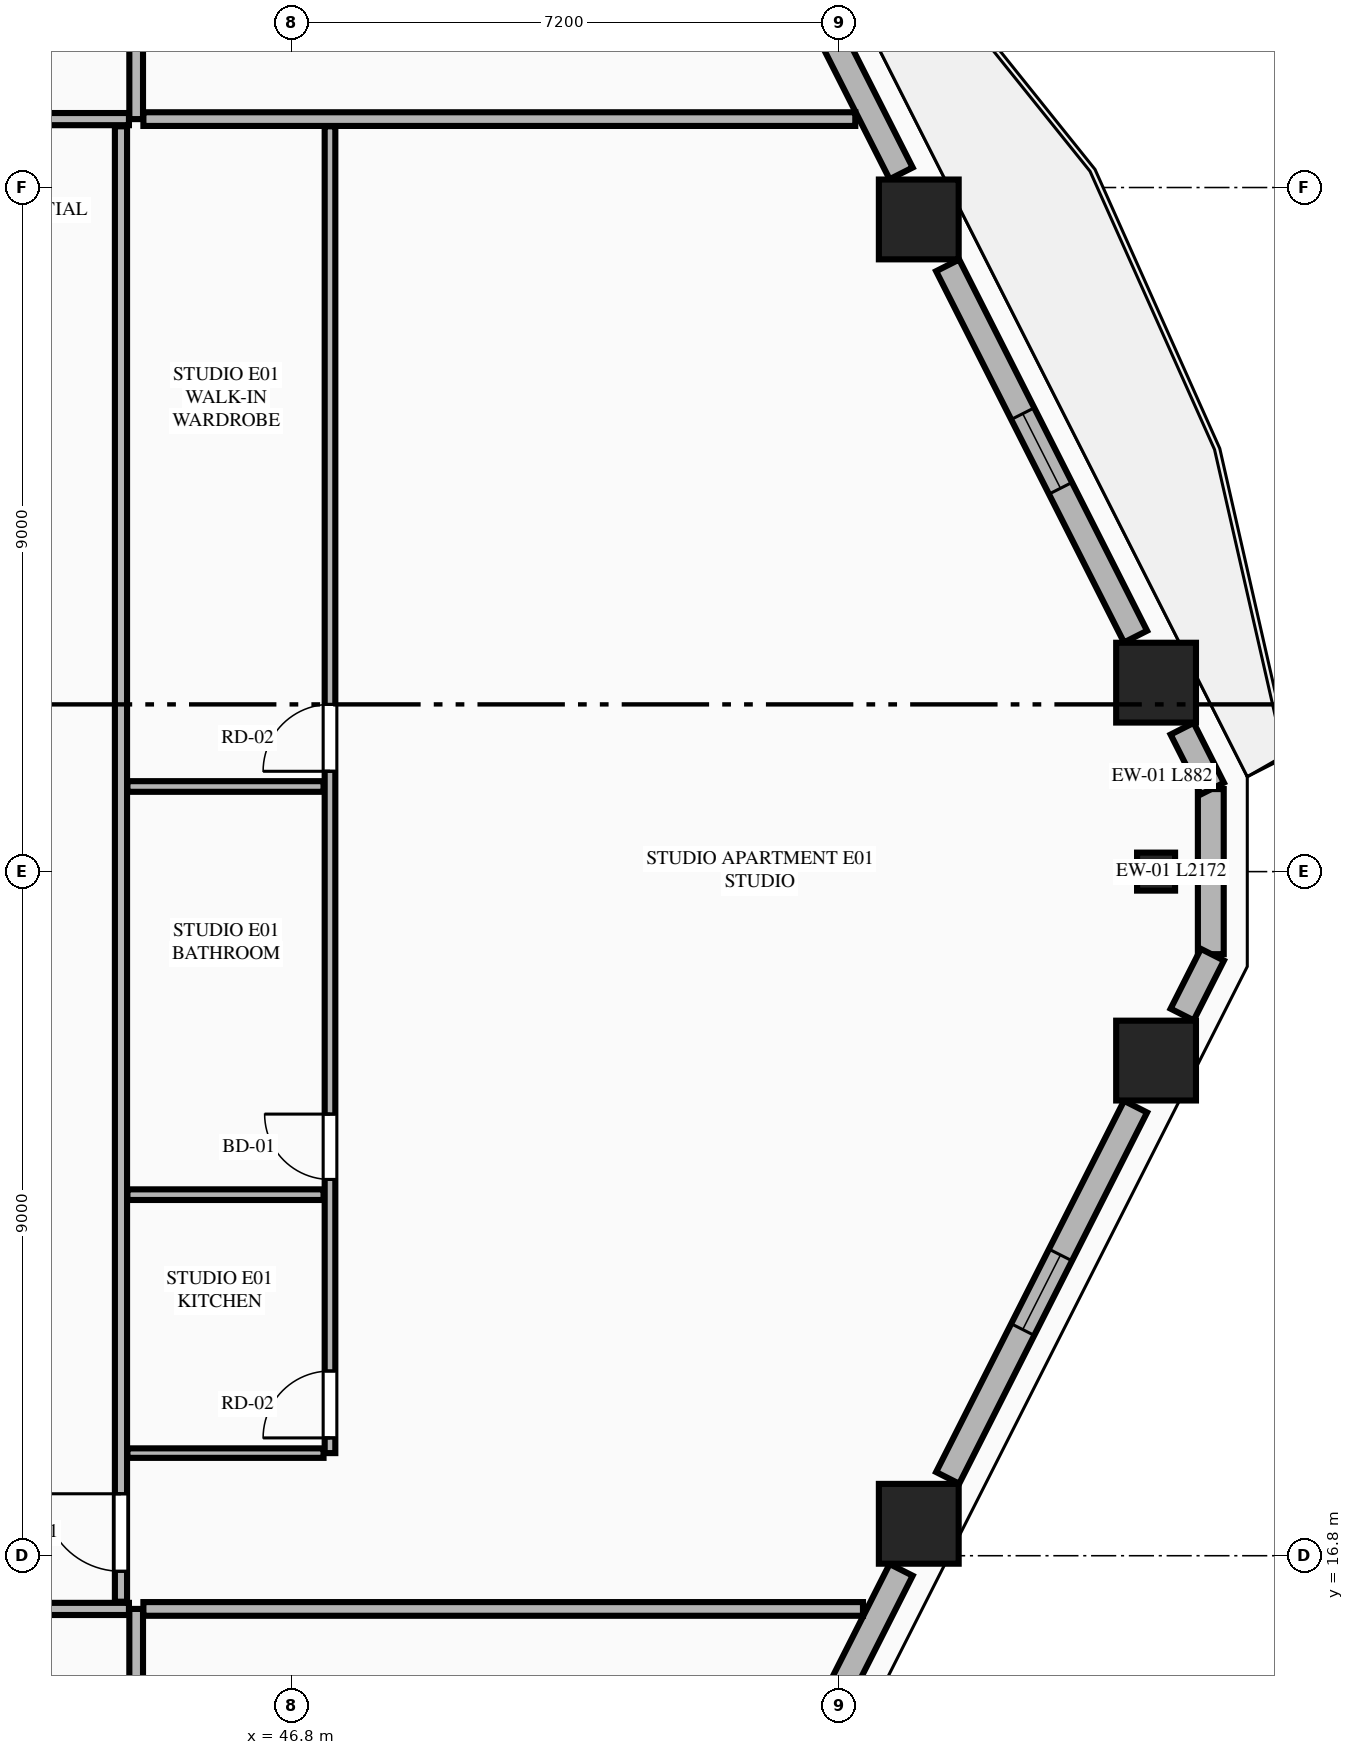
"""IFC4 building model, lengths in metres.
Left out: names, types, materials, properties, quantities, classifications, styles, units other than length and angle.
Written with IfcOpenShell. Run it as: python <this file> out.ifc"""

import sys

from ifc_helpers import new_model, si_unit, direction, frame, frame_2d, origin, origin_2d, place, context, subcontext, project, spatial, rectangle, extrude, element, fill, save


model = new_model("IFC4")
c1 = context("Model", 3, precision=1e-05, world=origin(), true_north=direction((0.0, 1.0)))
c2 = subcontext(c1, "Body", "Model", "MODEL_VIEW")
j1 = project(units=[si_unit("LENGTHUNIT", "METRE"), si_unit("PLANEANGLEUNIT", "RADIAN")], contexts=[c1])
p1 = place(None, origin())
s1 = spatial("IfcSite", under=j1, at=p1, CompositionType="ELEMENT")
p2 = place(p1, origin())
s2 = spatial("IfcBuilding", under=s1, at=p2, CompositionType="ELEMENT")
p3 = place(p2, frame((0.0, 0.0, 87.1)))
s3 = spatial("IfcBuildingStorey", under=s2, at=p3, CompositionType="ELEMENT", Elevation=87.1)
for number, where, z_axis, x_axis in (
    (1, (55.046, 17.22, 0.0), (0.0, 0.0, 1.0), (1.0, 0.0, 0.0)),
    (2, (58.168, 23.314, 0.0), (0.0, 0.0, 1.0), (1.0, 0.0, 0.0)),
    (3, (58.168, 28.286, 0.0), (0.0, 0.0, 1.0), (1.0, 0.0, 0.0)),
    (4, (55.046, 34.38, 0.0), (0.0, 0.0, 1.0), (1.0, 0.0, 0.0)),
):
    element("IfcColumn", number, at=place(p3, frame(where, z_axis=z_axis, x_axis=x_axis)), inside=s3, PredefinedType="COLUMN", context=c2, shape_type="SweptSolid", body=[
        extrude(rectangle(XDim=1.05, YDim=1.05, at=origin_2d()), origin(), (0.0, 0.0, 1.0), 3.55),
    ])
p4 = place(p3, frame((58.168, 25.8, 0.0), z_axis=(0.0, 0.0, 1.0), x_axis=(0.0, 1.0, 0.0)))
e5 = element("IfcColumn", 5, at=p4, inside=s3, PredefinedType="PILASTER", context=c2, shape_type="SweptSolid", body=[
    extrude(rectangle(XDim=0.5, YDim=0.35, at=origin_2d()), origin(), (0.0, 0.0, 1.0), 3.55),
])
p5 = place(p3, frame((58.888, 24.714, 0.0), z_axis=(0.0, 0.0, 1.0), x_axis=(0.0, 1.0, 0.0)))
e6 = element("IfcWall", 6, at=p5, inside=s3, PredefinedType="STANDARD", context=c2, shape_type="SweptSolid", body=[
    extrude(rectangle(XDim=2.172, YDim=0.34, at=frame_2d((1.086, 0.0))), origin(), (0.0, 0.0, 1.0), 3.33),
])
p6 = place(p3, frame((52.233, 11.515, 0.0), z_axis=(0.0, 0.0, 1.0), x_axis=(0.451616680182, 0.892212067942, 0.0)))
e7 = element("IfcWall", 7, at=p6, inside=s3, PredefinedType="STANDARD", context=c2, shape_type="SweptSolid", body=[
    extrude(rectangle(XDim=5.715, YDim=0.34, at=frame_2d((2.857, 0.0))), origin(), (0.0, 0.0, 1.0), 2.787),
])
p7 = place(p6, frame((2.308, 0.0, 0.75)))
e8 = element("IfcOpeningElement", 8, at=p7, cuts=e7, PredefinedType="OPENING", context=c2, shape_type="SweptSolid", body=[
    extrude(rectangle(XDim=1.1, YDim=1.887, at=frame_2d((0.55, 0.943))), frame((0.0, 0.18, 0.0), z_axis=(0.0, -1.0, 0.0), x_axis=(1.0, 0.0, 0.0)), (0.0, 0.0, 1.0), 0.36),
])
p8 = place(p3, frame((55.426, 17.824, 0.0), z_axis=(0.0, 0.0, 1.0), x_axis=(0.451579095309, 0.892231091523, 0.0)))
e9 = element("IfcWall", 9, at=p8, inside=s3, PredefinedType="STANDARD", context=c2, shape_type="SweptSolid", body=[
    extrude(rectangle(XDim=5.474, YDim=0.34, at=frame_2d((2.737, 0.0))), origin(), (0.0, 0.0, 1.0), 2.787),
])
p9 = place(p8, frame((2.187, 0.0, 0.75)))
e10 = element("IfcOpeningElement", 10, at=p9, cuts=e9, PredefinedType="OPENING", context=c2, shape_type="SweptSolid", body=[
    extrude(rectangle(XDim=1.1, YDim=1.887, at=frame_2d((0.55, 0.943))), frame((0.0, 0.18, 0.0), z_axis=(0.0, -1.0, 0.0), x_axis=(1.0, 0.0, 0.0)), (0.0, 0.0, 1.0), 0.36),
])
p10 = place(p3, frame((58.511, 23.92, 0.0), z_axis=(0.0, 0.0, 1.0), x_axis=(0.451195173259, 0.892425299747, 0.0)))
e11 = element("IfcWall", 11, at=p10, inside=s3, PredefinedType="STANDARD", context=c2, shape_type="SweptSolid", body=[
    extrude(rectangle(XDim=0.882, YDim=0.34, at=frame_2d((0.441, 0.0))), origin(), (0.0, 0.0, 1.0), 3.33),
])
p11 = place(p3, frame((58.909, 26.893, 0.0), z_axis=(0.0, 0.0, 1.0), x_axis=(-0.451306655769, 0.892368927327, 0.0)))
e12 = element("IfcWall", 12, at=p11, inside=s3, PredefinedType="STANDARD", context=c2, shape_type="SweptSolid", body=[
    extrude(rectangle(XDim=0.882, YDim=0.34, at=frame_2d((0.441, 0.0))), origin(), (0.0, 0.0, 1.0), 3.33),
])
p12 = place(p3, frame((57.898, 28.892, 0.0), z_axis=(0.0, 0.0, 1.0), x_axis=(-0.451597066012, 0.892221995901, 0.0)))
e13 = element("IfcWall", 13, at=p12, inside=s3, PredefinedType="STANDARD", context=c2, shape_type="SweptSolid", body=[
    extrude(rectangle(XDim=5.474, YDim=0.34, at=frame_2d((2.737, 0.0))), origin(), (0.0, 0.0, 1.0), 2.787),
])
p13 = place(p12, frame((2.187, 0.0, 0.75)))
e14 = element("IfcOpeningElement", 14, at=p13, cuts=e13, PredefinedType="OPENING", context=c2, shape_type="SweptSolid", body=[
    extrude(rectangle(XDim=1.1, YDim=1.887, at=frame_2d((0.55, 0.943))), frame((0.0, 0.18, 0.0), z_axis=(0.0, -1.0, 0.0), x_axis=(1.0, 0.0, 0.0)), (0.0, 0.0, 1.0), 0.36),
])
p14 = place(p3, frame((54.814, 34.986, 0.0), z_axis=(0.0, 0.0, 1.0), x_axis=(-0.451633893529, 0.892203354744, 0.0)))
e15 = element("IfcWall", 15, at=p14, inside=s3, PredefinedType="STANDARD", context=c2, shape_type="SweptSolid", body=[
    extrude(rectangle(XDim=5.715, YDim=0.34, at=frame_2d((2.857, 0.0))), origin(), (0.0, 0.0, 1.0), 2.787),
])
p15 = place(p14, frame((2.833, 0.0, 0.0)))
e16 = element("IfcOpeningElement", 16, at=p15, cuts=e15, PredefinedType="OPENING", context=c2, shape_type="SweptSolid", body=[
    extrude(rectangle(XDim=1.1, YDim=2.25, at=frame_2d((0.55, 1.125))), frame((0.0, 0.18, 0.0), z_axis=(0.0, -1.0, 0.0), x_axis=(1.0, 0.0, 0.0)), (0.0, 0.0, 1.0), 0.36),
])
p16 = place(p3, frame((44.75, 2.455, 0.0), z_axis=(0.0, 0.0, 1.0), x_axis=(0.0, 1.0, 0.0)))
e17 = element("IfcWall", 17, at=p16, inside=s3, PredefinedType="PARTITIONING", context=c2, shape_type="SweptSolid", body=[
    extrude(rectangle(XDim=13.645, YDim=0.18, at=frame_2d((6.823, 0.0))), origin(), (0.0, 0.0, 1.0), 3.33),
])
p17 = place(p3, frame((36.617, 16.1, 0.0), z_axis=(0.0, 0.0, 1.0), x_axis=(1.0, 0.0, 0.0)))
e18 = element("IfcWall", 18, at=p17, inside=s3, PredefinedType="PARTITIONING", context=c2, shape_type="SweptSolid", body=[
    extrude(rectangle(XDim=8.038, YDim=0.16, at=frame_2d((4.019, 0.0))), origin(), (0.0, 0.0, 1.0), 3.33),
])
p18 = place(p17, frame((0.355, 0.0, 0.0)))
e19 = element("IfcOpeningElement", 19, at=p18, cuts=e18, PredefinedType="OPENING", context=c2, shape_type="SweptSolid", body=[
    extrude(rectangle(XDim=1.02, YDim=2.25, at=frame_2d((0.51, 1.125))), frame((0.0, 0.09, 0.0), z_axis=(0.0, -1.0, 0.0), x_axis=(1.0, 0.0, 0.0)), (0.0, 0.0, 1.0), 0.18),
])
p19 = place(p3, frame((44.75, 35.7, 0.0), z_axis=(0.0, 0.0, 1.0), x_axis=(0.0, 1.0, 0.0)))
e20 = element("IfcWall", 20, at=p19, inside=s3, PredefinedType="PARTITIONING", context=c2, shape_type="SweptSolid", body=[
    extrude(rectangle(XDim=13.445, YDim=0.18, at=frame_2d((6.723, 0.0))), origin(), (0.0, 0.0, 1.0), 3.33),
])
p20 = place(p3, frame((20.145, 35.7, 0.0), z_axis=(0.0, 0.0, 1.0), x_axis=(1.0, 0.0, 0.0)))
e21 = element("IfcWall", 21, at=p20, inside=s3, PredefinedType="PARTITIONING", context=c2, shape_type="SweptSolid", body=[
    extrude(rectangle(XDim=24.51, YDim=0.16, at=frame_2d((12.255, 0.0))), origin(), (0.0, 0.0, 1.0), 3.33),
])
p21 = place(p20, frame((0.705, 0.0, 0.0)))
e22 = element("IfcOpeningElement", 22, at=p21, cuts=e21, PredefinedType="OPENING", context=c2, shape_type="SweptSolid", body=[
    extrude(rectangle(XDim=1.02, YDim=2.25, at=frame_2d((0.51, 1.125))), frame((0.0, 0.09, 0.0), z_axis=(0.0, -1.0, 0.0), x_axis=(1.0, 0.0, 0.0)), (0.0, 0.0, 1.0), 0.18),
])
p22 = place(p3, frame((44.845, 16.1, 0.0), z_axis=(0.0, 0.0, 1.0), x_axis=(1.0, 0.0, 0.0)))
e23 = element("IfcWall", 23, at=p22, inside=s3, PredefinedType="PARTITIONING", context=c2, shape_type="SweptSolid", body=[
    extrude(rectangle(XDim=9.467, YDim=0.18, at=frame_2d((4.733, 0.0))), origin(), (0.0, 0.0, 1.0), 3.33),
])
p23 = place(p3, frame((44.845, 35.7, 0.0), z_axis=(0.0, 0.0, 1.0), x_axis=(1.0, 0.0, 0.0)))
e24 = element("IfcWall", 24, at=p23, inside=s3, PredefinedType="PARTITIONING", context=c2, shape_type="SweptSolid", body=[
    extrude(rectangle(XDim=9.366, YDim=0.18, at=frame_2d((4.683, 0.0))), origin(), (0.0, 0.0, 1.0), 3.33),
])
p24 = place(p3, frame((44.55, 16.195, 0.0), z_axis=(0.0, 0.0, 1.0), x_axis=(0.0, 1.0, 0.0)))
e25 = element("IfcWall", 25, at=p24, inside=s3, PredefinedType="PARTITIONING", context=c2, shape_type="SweptSolid", body=[
    extrude(rectangle(XDim=19.41, YDim=0.16, at=frame_2d((9.705, 0.0))), origin(), (0.0, 0.0, 1.0), 2.7),
])
p25 = place(p24, frame((0.4, 0.0, 0.0)))
e26 = element("IfcOpeningElement", 26, at=p25, cuts=e25, PredefinedType="OPENING", context=c2, shape_type="SweptSolid", body=[
    extrude(rectangle(XDim=1.02, YDim=2.25, at=frame_2d((0.51, 1.125))), frame((0.0, 0.09, 0.0), z_axis=(0.0, -1.0, 0.0), x_axis=(1.0, 0.0, 0.0)), (0.0, 0.0, 1.0), 0.18),
])
p26 = place(p3, frame((44.635, 18.15, 0.0), z_axis=(0.0, 0.0, 1.0), x_axis=(1.0, 0.0, 0.0)))
e27 = element("IfcWall", 27, at=p26, inside=s3, PredefinedType="PARTITIONING", context=c2, shape_type="SweptSolid", body=[
    extrude(rectangle(XDim=2.58, YDim=0.125, at=frame_2d((1.29, 0.0))), origin(), (0.0, 0.0, 1.0), 2.7),
])
p27 = place(p3, frame((47.3, 18.15, 0.0), z_axis=(0.0, 0.0, 1.0), x_axis=(0.0, 1.0, 0.0)))
e28 = element("IfcWall", 28, at=p27, inside=s3, PredefinedType="PLUMBINGWALL", context=c2, shape_type="SweptSolid", body=[
    extrude(rectangle(XDim=17.455, YDim=0.14, at=frame_2d((8.728, 0.0))), origin(), (0.0, 0.0, 1.0), 3.33),
])
p28 = place(p27, frame((3.6, 0.0, 0.0)))
e29 = element("IfcOpeningElement", 29, at=p28, cuts=e28, PredefinedType="OPENING", context=c2, shape_type="SweptSolid", body=[
    extrude(rectangle(XDim=0.86, YDim=2.1, at=frame_2d((0.43, 1.05))), frame((0.0, 0.08, 0.0), z_axis=(0.0, -1.0, 0.0), x_axis=(1.0, 0.0, 0.0)), (0.0, 0.0, 1.0), 0.16),
])
p29 = place(p27, frame((8.97, 0.0, 0.0)))
e30 = element("IfcOpeningElement", 30, at=p29, cuts=e28, PredefinedType="OPENING", context=c2, shape_type="SweptSolid", body=[
    extrude(rectangle(XDim=0.88, YDim=2.15, at=frame_2d((0.44, 1.075))), frame((0.0, 0.08, 0.0), z_axis=(0.0, -1.0, 0.0), x_axis=(1.0, 0.0, 0.0)), (0.0, 0.0, 1.0), 0.16),
])
p30 = place(p27, frame((0.2, 0.0, 0.0)))
e31 = element("IfcOpeningElement", 31, at=p30, cuts=e28, PredefinedType="OPENING", context=c2, shape_type="SweptSolid", body=[
    extrude(rectangle(XDim=0.88, YDim=2.15, at=frame_2d((0.44, 1.075))), frame((0.0, 0.08, 0.0), z_axis=(0.0, -1.0, 0.0), x_axis=(1.0, 0.0, 0.0)), (0.0, 0.0, 1.0), 0.16),
])
for number, where, z_axis, x_axis in (
    (32, (44.635, 21.55, 0.0), (0.0, 0.0, 1.0), (1.0, 0.0, 0.0)),
    (33, (44.635, 26.92, 0.0), (0.0, 0.0, 1.0), (1.0, 0.0, 0.0)),
):
    element("IfcWall", number, at=place(p3, frame(where, z_axis=z_axis, x_axis=x_axis)), inside=s3, PredefinedType="PLUMBINGWALL", context=c2, shape_type="SweptSolid", body=[
        extrude(rectangle(XDim=2.58, YDim=0.14, at=frame_2d((1.29, 0.0))), origin(), (0.0, 0.0, 1.0), 3.33),
    ])
p31 = place(p9, origin())
e34 = element("IfcWindow", 34, at=p31, inside=s3, PartitioningType="SINGLE_PANEL", PredefinedType="WINDOW", context=c2, shape_type="SweptSolid", body=[
    extrude(rectangle(XDim=1.1, YDim=1.887, at=frame_2d((0.55, 0.943))), frame((0.0, 0.03, 0.0), z_axis=(0.0, -1.0, 0.0), x_axis=(1.0, 0.0, 0.0)), (0.0, 0.0, 1.0), 0.06),
])
fill(e10, e34)
p32 = place(p13, origin())
e35 = element("IfcWindow", 35, at=p32, inside=s3, PartitioningType="SINGLE_PANEL", PredefinedType="WINDOW", context=c2, shape_type="SweptSolid", body=[
    extrude(rectangle(XDim=1.1, YDim=1.887, at=frame_2d((0.55, 0.943))), frame((0.0, 0.03, 0.0), z_axis=(0.0, -1.0, 0.0), x_axis=(1.0, 0.0, 0.0)), (0.0, 0.0, 1.0), 0.06),
])
fill(e14, e35)
p33 = place(p28, origin())
e36 = element("IfcDoor", 36, at=p33, inside=s3, OperationType="SINGLE_SWING_RIGHT", PredefinedType="DOOR", context=c2, shape_type="SweptSolid", body=[
    extrude(rectangle(XDim=0.86, YDim=2.1, at=frame_2d((0.43, 1.05))), frame((0.0, 0.025, 0.0), z_axis=(0.0, -1.0, 0.0), x_axis=(1.0, 0.0, 0.0)), (0.0, 0.0, 1.0), 0.05),
])
fill(e29, e36)
p34 = place(p29, origin())
e37 = element("IfcDoor", 37, at=p34, inside=s3, OperationType="SINGLE_SWING_LEFT", PredefinedType="DOOR", context=c2, shape_type="SweptSolid", body=[
    extrude(rectangle(XDim=0.88, YDim=2.15, at=frame_2d((0.44, 1.075))), frame((0.0, 0.025, 0.0), z_axis=(0.0, -1.0, 0.0), x_axis=(1.0, 0.0, 0.0)), (0.0, 0.0, 1.0), 0.05),
])
fill(e30, e37)
p35 = place(p25, origin())
e38 = element("IfcDoor", 38, at=p35, inside=s3, OperationType="SINGLE_SWING_RIGHT", PredefinedType="DOOR", context=c2, shape_type="SweptSolid", body=[
    extrude(rectangle(XDim=1.02, YDim=2.25, at=frame_2d((0.51, 1.125))), frame((0.0, 0.025, 0.0), z_axis=(0.0, -1.0, 0.0), x_axis=(1.0, 0.0, 0.0)), (0.0, 0.0, 1.0), 0.05),
])
fill(e26, e38)
p36 = place(p30, origin())
e39 = element("IfcDoor", 39, at=p36, inside=s3, OperationType="SINGLE_SWING_LEFT", PredefinedType="DOOR", context=c2, shape_type="SweptSolid", body=[
    extrude(rectangle(XDim=0.88, YDim=2.15, at=frame_2d((0.44, 1.075))), frame((0.0, 0.025, 0.0), z_axis=(0.0, -1.0, 0.0), x_axis=(1.0, 0.0, 0.0)), (0.0, 0.0, 1.0), 0.05),
])
fill(e31, e39)
save(model, sys.argv[1])
